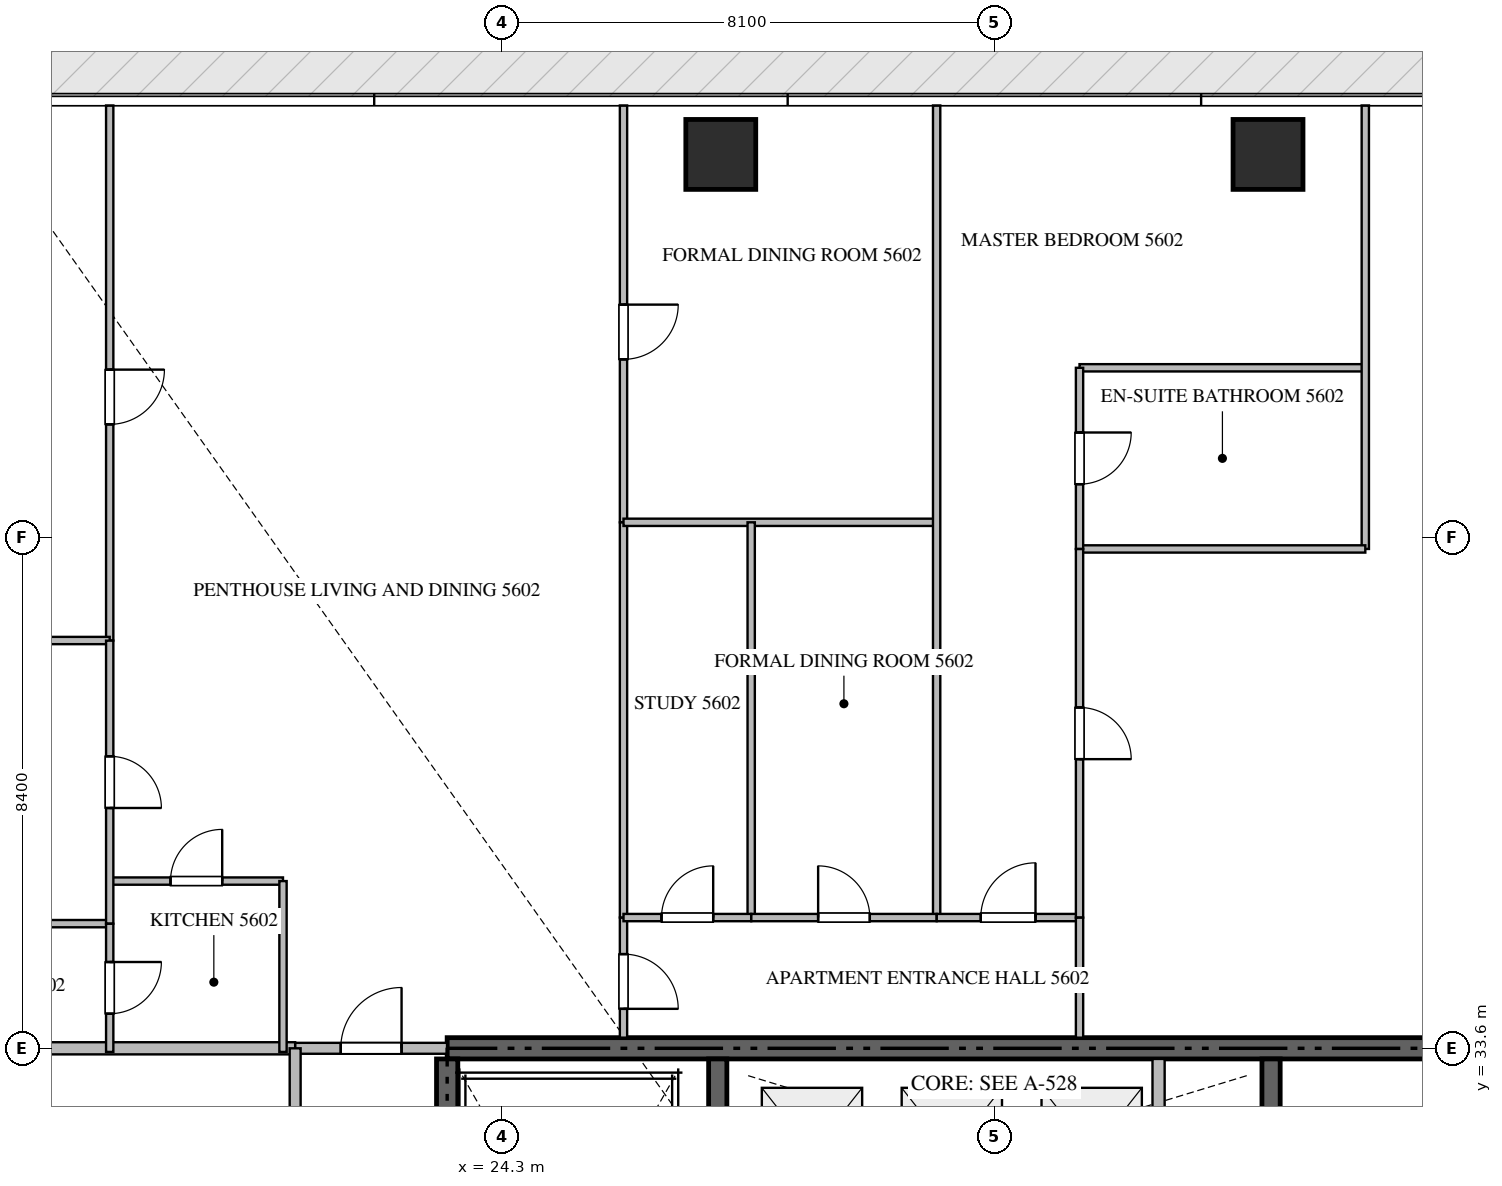
"""IFC4 building model, lengths in metres.
Left out: names, types, materials, properties, quantities, classifications, styles, units other than length and angle.
Written with IfcOpenShell. Run it as: python <this file> out.ifc"""

import sys

from ifc_helpers import new_model, si_unit, direction, frame, frame_2d, origin, origin_2d, place, context, subcontext, project, spatial, rectangle, extrude, source, transform, mapped, element, fill, save


model = new_model("IFC4")
c1 = context("Model", 3, precision=1e-05, world=origin(), true_north=direction((0.0, 1.0)))
c2 = subcontext(c1, "Body", "Model", "MODEL_VIEW")
j1 = project(units=[si_unit("LENGTHUNIT", "METRE"), si_unit("PLANEANGLEUNIT", "RADIAN")], contexts=[c1])
p1 = place(None, origin())
s1 = spatial("IfcSite", under=j1, at=p1, CompositionType="ELEMENT")
p2 = place(p1, origin())
s2 = spatial("IfcBuilding", under=s1, at=p2, CompositionType="ELEMENT")
p3 = place(p2, frame((0.0, 0.0, 225.85)))
s3 = spatial("IfcBuildingStorey", under=s2, at=p3, CompositionType="ELEMENT", Elevation=225.85)
p4 = place(p3, frame((41.4, 33.6, -0.26), z_axis=(0.0, 0.0, 1.0), x_axis=(-1.0, 0.0, 0.0)))
e1 = element("IfcWall", 1, at=p4, inside=s3, PredefinedType="SHEAR", context=c2, shape_type="SweptSolid", body=[
    extrude(rectangle(XDim=18.0, YDim=0.35, at=frame_2d((9.0, 0.0))), origin(), (0.0, 0.0, 1.0), 3.848),
])
p5 = place(p3, frame((23.4, 24.25, -0.26), z_axis=(0.0, 0.0, 1.0), x_axis=(0.0, 1.0, 0.0)))
e2 = element("IfcWall", 2, at=p5, inside=s3, PredefinedType="SHEAR", context=c2, shape_type="SweptSolid", body=[
    extrude(rectangle(XDim=9.175, YDim=0.35, at=frame_2d((4.587, 0.0))), origin(), (0.0, 0.0, 1.0), 3.848),
])
p6 = place(p3, frame((27.85, 23.55, -0.26), z_axis=(0.0, 0.0, 1.0), x_axis=(0.0, 1.0, 0.0)))
e3 = element("IfcWall", 3, at=p6, inside=s3, PredefinedType="SHEAR", context=c2, shape_type="SweptSolid", body=[
    extrude(rectangle(XDim=9.875, YDim=0.3, at=frame_2d((4.938, 0.0))), origin(), (0.0, 0.0, 1.0), 3.848),
])
p7 = place(p3, frame((36.95, 27.05, -0.26), z_axis=(0.0, 0.0, 1.0), x_axis=(0.0, 1.0, 0.0)))
e4 = element("IfcWall", 4, at=p7, inside=s3, PredefinedType="SHEAR", context=c2, shape_type="SweptSolid", body=[
    extrude(rectangle(XDim=6.375, YDim=0.3, at=frame_2d((3.188, 0.0))), origin(), (0.0, 0.0, 1.0), 3.848),
])
m1 = source(origin(), c2, "Body", "SweptSolid", [
    extrude(rectangle(XDim=1.15, YDim=1.15, at=origin_2d()), origin(), (0.0, 0.0, 1.0), 3.85),
])
for number, where, z_axis, x_axis in (
    (5, (27.9, 48.3, -0.26), (0.0, 0.0, 1.0), (1.0, 0.0, 0.0)),
    (6, (36.9, 48.3, -0.26), (0.0, 0.0, 1.0), (1.0, 0.0, 0.0)),
):
    element("IfcColumn", number, at=place(p3, frame(where, z_axis=z_axis, x_axis=x_axis)), inside=s3, PredefinedType="COLUMN", context=c2, shape_type="MappedRepresentation", body=[
        mapped(m1, transform((0.0, 0.0, 0.0), scale=1.0)),
    ])
p8 = place(p3, frame((35.1, 30.75, 0.0), z_axis=(0.0, 0.0, 1.0), x_axis=(0.0, 1.0, 0.0)))
e7 = element("IfcWall", 7, at=p8, inside=s3, PredefinedType="STANDARD", context=c2, shape_type="SweptSolid", body=[
    extrude(rectangle(XDim=2.675, YDim=0.2, at=frame_2d((1.337, 0.0))), origin(), (0.0, 0.0, 1.0), 3.59),
])
p9 = place(p3, frame((7.482, 33.6, 0.0), z_axis=(0.0, 0.0, 1.0), x_axis=(1.0, 0.0, 0.0)))
e8 = element("IfcWall", 8, at=p9, inside=s3, PredefinedType="PARTITIONING", context=c2, shape_type="SweptSolid", body=[
    extrude(rectangle(XDim=13.418, YDim=0.2, at=frame_2d((6.709, 0.0))), origin(), (0.0, 0.0, 1.0), 3.59),
])
p10 = place(p3, frame((20.902, 33.6, 0.0), z_axis=(0.0, 0.0, 1.0), x_axis=(1.0, 0.0, 0.0)))
e9 = element("IfcWall", 9, at=p10, inside=s3, PredefinedType="PARTITIONING", context=c2, shape_type="SweptSolid", body=[
    extrude(rectangle(XDim=2.496, YDim=0.18, at=frame_2d((1.248, 0.0))), origin(), (0.0, 0.0, 1.0), 3.59),
])
p11 = place(p10, frame((0.748, 0.0, 0.0)))
e10 = element("IfcOpeningElement", 10, at=p11, cuts=e9, PredefinedType="OPENING", context=c2, shape_type="SweptSolid", body=[
    extrude(rectangle(XDim=1.0, YDim=2.15, at=frame_2d((0.5, 1.075))), frame((0.0, 0.1, 0.0), z_axis=(0.0, -1.0, 0.0), x_axis=(1.0, 0.0, 0.0)), (0.0, 0.0, 1.0), 0.2),
])
p12 = place(p3, frame((20.9, 16.8, 0.0), z_axis=(0.0, 0.0, 1.0), x_axis=(0.0, 1.0, 0.0)))
e11 = element("IfcWall", 11, at=p12, inside=s3, PredefinedType="PARTITIONING", context=c2, shape_type="SweptSolid", body=[
    extrude(rectangle(XDim=16.8, YDim=0.18, at=frame_2d((8.4, 0.0))), origin(), (0.0, 0.0, 1.0), 3.59),
])
p13 = place(p12, frame((14.5, 0.0, 0.0)))
e12 = element("IfcOpeningElement", 12, at=p13, cuts=e11, PredefinedType="OPENING", context=c2, shape_type="SweptSolid", body=[
    extrude(rectangle(XDim=1.0, YDim=2.15, at=frame_2d((0.5, 1.075))), frame((0.0, 0.1, 0.0), z_axis=(0.0, -1.0, 0.0), x_axis=(1.0, 0.0, 0.0)), (0.0, 0.0, 1.0), 0.2),
])
p14 = place(p3, frame((17.85, 36.35, 0.0), z_axis=(0.0, 0.0, 1.0), x_axis=(1.0, 0.0, 0.0)))
e13 = element("IfcWall", 13, at=p14, inside=s3, PredefinedType="PARTITIONING", context=c2, shape_type="SweptSolid", body=[
    extrude(rectangle(XDim=2.85, YDim=0.12, at=frame_2d((1.425, 0.0))), origin(), (0.0, 0.0, 1.0), 3.59),
])
p15 = place(p14, frame((1.0, 0.0, 0.0)))
e14 = element("IfcOpeningElement", 14, at=p15, cuts=e13, PredefinedType="OPENING", context=c2, shape_type="SweptSolid", body=[
    extrude(rectangle(XDim=0.85, YDim=2.1, at=frame_2d((0.425, 1.05))), frame((0.0, 0.07, 0.0), z_axis=(0.0, -1.0, 0.0), x_axis=(1.0, 0.0, 0.0)), (0.0, 0.0, 1.0), 0.14),
])
p16 = place(p3, frame((20.7, 36.35, 0.0), z_axis=(0.0, 0.0, 1.0), x_axis=(0.0, -1.0, 0.0)))
e15 = element("IfcWall", 15, at=p16, inside=s3, PredefinedType="PARTITIONING", context=c2, shape_type="SweptSolid", body=[
    extrude(rectangle(XDim=2.81, YDim=0.12, at=frame_2d((1.405, 0.0))), origin(), (0.0, 0.0, 1.0), 3.59),
])
p17 = place(p3, frame((17.85, 49.105, 0.0), z_axis=(0.0, 0.0, 1.0), x_axis=(0.0, -1.0, 0.0)))
e16 = element("IfcWall", 16, at=p17, inside=s3, PredefinedType="PARTITIONING", context=c2, shape_type="SweptSolid", body=[
    extrude(rectangle(XDim=8.799, YDim=0.12, at=frame_2d((4.399, 0.0))), origin(), (0.0, 0.0, 1.0), 3.59),
])
p18 = place(p17, frame((4.344, 0.0, 0.0)))
e17 = element("IfcOpeningElement", 17, at=p18, cuts=e16, PredefinedType="OPENING", context=c2, shape_type="SweptSolid", body=[
    extrude(rectangle(XDim=0.9, YDim=2.1, at=frame_2d((0.45, 1.05))), frame((0.0, 0.07, 0.0), z_axis=(0.0, -1.0, 0.0), x_axis=(1.0, 0.0, 0.0)), (0.0, 0.0, 1.0), 0.14),
])
p19 = place(p3, frame((7.495, 40.306, 0.0), z_axis=(0.0, 0.0, 1.0), x_axis=(1.0, 0.0, 0.0)))
e18 = element("IfcWall", 18, at=p19, inside=s3, PredefinedType="PARTITIONING", context=c2, shape_type="SweptSolid", body=[
    extrude(rectangle(XDim=10.355, YDim=0.12, at=frame_2d((5.177, 0.0))), origin(), (0.0, 0.0, 1.0), 3.122),
])
p20 = place(p3, frame((14.65, 35.65, 0.0), z_axis=(0.0, 0.0, 1.0), x_axis=(1.0, 0.0, 0.0)))
e19 = element("IfcWall", 19, at=p20, inside=s3, PredefinedType="PARTITIONING", context=c2, shape_type="SweptSolid", body=[
    extrude(rectangle(XDim=3.2, YDim=0.12, at=frame_2d((1.6, 0.0))), origin(), (0.0, 0.0, 1.0), 3.59),
])
p21 = place(p3, frame((17.85, 40.304, 0.0), z_axis=(0.0, 0.0, 1.0), x_axis=(0.0, -1.0, 0.0)))
e20 = element("IfcWall", 20, at=p21, inside=s3, PredefinedType="PARTITIONING", context=c2, shape_type="SweptSolid", body=[
    extrude(rectangle(XDim=4.654, YDim=0.12, at=frame_2d((2.327, 0.0))), origin(), (0.0, 0.0, 1.0), 3.59),
])
p22 = place(p21, frame((1.902, 0.0, 0.0)))
e21 = element("IfcOpeningElement", 21, at=p22, cuts=e20, PredefinedType="OPENING", context=c2, shape_type="SweptSolid", body=[
    extrude(rectangle(XDim=0.85, YDim=2.1, at=frame_2d((0.425, 1.05))), frame((0.0, 0.07, 0.0), z_axis=(0.0, -1.0, 0.0), x_axis=(1.0, 0.0, 0.0)), (0.0, 0.0, 1.0), 0.14),
])
p23 = place(p3, frame((17.85, 35.648, 0.0), z_axis=(0.0, 0.0, 1.0), x_axis=(0.0, -1.0, 0.0)))
e22 = element("IfcWall", 22, at=p23, inside=s3, PredefinedType="PARTITIONING", context=c2, shape_type="SweptSolid", body=[
    extrude(rectangle(XDim=2.108, YDim=0.12, at=frame_2d((1.054, 0.0))), origin(), (0.0, 0.0, 1.0), 3.59),
])
p24 = place(p23, frame((0.629, 0.0, 0.0)))
e23 = element("IfcOpeningElement", 23, at=p24, cuts=e22, PredefinedType="OPENING", context=c2, shape_type="SweptSolid", body=[
    extrude(rectangle(XDim=0.85, YDim=2.1, at=frame_2d((0.425, 1.05))), frame((0.0, 0.07, 0.0), z_axis=(0.0, -1.0, 0.0), x_axis=(1.0, 0.0, 0.0)), (0.0, 0.0, 1.0), 0.14),
])
p25 = place(p3, frame((26.3, 35.75, 0.0), z_axis=(0.0, 0.0, 1.0), x_axis=(0.0, -1.0, 0.0)))
e24 = element("IfcWall", 24, at=p25, inside=s3, PredefinedType="PARTITIONING", context=c2, shape_type="SweptSolid", body=[
    extrude(rectangle(XDim=1.975, YDim=0.12, at=frame_2d((0.988, 0.0))), origin(), (0.0, 0.0, 1.0), 3.59),
])
p26 = place(p25, frame((0.601, 0.0, 0.0)))
e25 = element("IfcOpeningElement", 25, at=p26, cuts=e24, PredefinedType="OPENING", context=c2, shape_type="SweptSolid", body=[
    extrude(rectangle(XDim=0.9, YDim=2.1, at=frame_2d((0.45, 1.05))), frame((0.0, 0.07, 0.0), z_axis=(0.0, -1.0, 0.0), x_axis=(1.0, 0.0, 0.0)), (0.0, 0.0, 1.0), 0.14),
])
p27 = place(p3, frame((26.3, 49.105, 0.0), z_axis=(0.0, 0.0, 1.0), x_axis=(0.0, -1.0, 0.0)))
e26 = element("IfcWall", 26, at=p27, inside=s3, PredefinedType="PARTITIONING", context=c2, shape_type="SweptSolid", body=[
    extrude(rectangle(XDim=6.855, YDim=0.12, at=frame_2d((3.427, 0.0))), origin(), (0.0, 0.0, 1.0), 3.59),
])
p28 = place(p27, frame((3.275, 0.0, 0.0)))
e27 = element("IfcOpeningElement", 27, at=p28, cuts=e26, PredefinedType="OPENING", context=c2, shape_type="SweptSolid", body=[
    extrude(rectangle(XDim=0.9, YDim=2.1, at=frame_2d((0.45, 1.05))), frame((0.0, 0.07, 0.0), z_axis=(0.0, -1.0, 0.0), x_axis=(1.0, 0.0, 0.0)), (0.0, 0.0, 1.0), 0.14),
])
p29 = place(p3, frame((26.3, 42.248, 0.0), z_axis=(0.0, 0.0, 1.0), x_axis=(0.0, -1.0, 0.0)))
e28 = element("IfcWall", 28, at=p29, inside=s3, PredefinedType="PARTITIONING", context=c2, shape_type="SweptSolid", body=[
    extrude(rectangle(XDim=6.496, YDim=0.12, at=frame_2d((3.248, 0.0))), origin(), (0.0, 0.0, 1.0), 3.59),
])
p30 = place(p3, frame((26.3, 42.25, 0.0), z_axis=(0.0, 0.0, 1.0), x_axis=(1.0, 0.0, 0.0)))
e29 = element("IfcWall", 29, at=p30, inside=s3, PredefinedType="PARTITIONING", context=c2, shape_type="SweptSolid", body=[
    extrude(rectangle(XDim=5.15, YDim=0.12, at=frame_2d((2.575, 0.0))), origin(), (0.0, 0.0, 1.0), 3.59),
])
p31 = place(p3, frame((31.45, 49.105, 0.0), z_axis=(0.0, 0.0, 1.0), x_axis=(0.0, -1.0, 0.0)))
e30 = element("IfcWall", 30, at=p31, inside=s3, PredefinedType="PARTITIONING", context=c2, shape_type="SweptSolid", body=[
    extrude(rectangle(XDim=13.355, YDim=0.12, at=frame_2d((6.677, 0.0))), origin(), (0.0, 0.0, 1.0), 3.59),
])
p32 = place(p3, frame((28.4, 42.25, 0.0), z_axis=(0.0, 0.0, 1.0), x_axis=(0.0, -1.0, 0.0)))
e31 = element("IfcWall", 31, at=p32, inside=s3, PredefinedType="PARTITIONING", context=c2, shape_type="SweptSolid", body=[
    extrude(rectangle(XDim=6.5, YDim=0.12, at=frame_2d((3.25, 0.0))), origin(), (0.0, 0.0, 1.0), 3.59),
])
p33 = place(p3, frame((26.3, 35.75, 0.0), z_axis=(0.0, 0.0, 1.0), x_axis=(1.0, 0.0, 0.0)))
e32 = element("IfcWall", 32, at=p33, inside=s3, PredefinedType="PARTITIONING", context=c2, shape_type="SweptSolid", body=[
    extrude(rectangle(XDim=2.1, YDim=0.12, at=frame_2d((1.05, 0.0))), origin(), (0.0, 0.0, 1.0), 3.59),
])
p34 = place(p33, frame((0.625, 0.0, 0.0)))
e33 = element("IfcOpeningElement", 33, at=p34, cuts=e32, PredefinedType="OPENING", context=c2, shape_type="SweptSolid", body=[
    extrude(rectangle(XDim=0.85, YDim=2.1, at=frame_2d((0.425, 1.05))), frame((0.0, 0.07, 0.0), z_axis=(0.0, -1.0, 0.0), x_axis=(1.0, 0.0, 0.0)), (0.0, 0.0, 1.0), 0.14),
])
p35 = place(p3, frame((28.402, 35.75, 0.0), z_axis=(0.0, 0.0, 1.0), x_axis=(1.0, 0.0, 0.0)))
e34 = element("IfcWall", 34, at=p35, inside=s3, PredefinedType="PARTITIONING", context=c2, shape_type="SweptSolid", body=[
    extrude(rectangle(XDim=3.048, YDim=0.12, at=frame_2d((1.524, 0.0))), origin(), (0.0, 0.0, 1.0), 3.59),
])
p36 = place(p35, frame((1.099, 0.0, 0.0)))
e35 = element("IfcOpeningElement", 35, at=p36, cuts=e34, PredefinedType="OPENING", context=c2, shape_type="SweptSolid", body=[
    extrude(rectangle(XDim=0.85, YDim=2.1, at=frame_2d((0.425, 1.05))), frame((0.0, 0.07, 0.0), z_axis=(0.0, -1.0, 0.0), x_axis=(1.0, 0.0, 0.0)), (0.0, 0.0, 1.0), 0.14),
])
p37 = place(p3, frame((31.452, 35.75, 0.0), z_axis=(0.0, 0.0, 1.0), x_axis=(1.0, 0.0, 0.0)))
e36 = element("IfcWall", 36, at=p37, inside=s3, PredefinedType="PARTITIONING", context=c2, shape_type="SweptSolid", body=[
    extrude(rectangle(XDim=2.348, YDim=0.12, at=frame_2d((1.174, 0.0))), origin(), (0.0, 0.0, 1.0), 3.59),
])
p38 = place(p37, frame((0.724, 0.0, 0.0)))
e37 = element("IfcOpeningElement", 37, at=p38, cuts=e36, PredefinedType="OPENING", context=c2, shape_type="SweptSolid", body=[
    extrude(rectangle(XDim=0.9, YDim=2.1, at=frame_2d((0.45, 1.05))), frame((0.0, 0.07, 0.0), z_axis=(0.0, -1.0, 0.0), x_axis=(1.0, 0.0, 0.0)), (0.0, 0.0, 1.0), 0.14),
])
p39 = place(p3, frame((33.8, 44.791, 0.0), z_axis=(0.0, 0.0, 1.0), x_axis=(1.0, 0.0, 0.0)))
e38 = element("IfcWall", 38, at=p39, inside=s3, PredefinedType="PARTITIONING", context=c2, shape_type="SweptSolid", body=[
    extrude(rectangle(XDim=4.7, YDim=0.12, at=frame_2d((2.35, 0.0))), origin(), (0.0, 0.0, 1.0), 3.59),
])
p40 = place(p3, frame((38.5, 49.105, 0.0), z_axis=(0.0, 0.0, 1.0), x_axis=(0.0, -1.0, 0.0)))
e39 = element("IfcWall", 39, at=p40, inside=s3, PredefinedType="PARTITIONING", context=c2, shape_type="SweptSolid", body=[
    extrude(rectangle(XDim=7.293, YDim=0.12, at=frame_2d((3.646, 0.0))), origin(), (0.0, 0.0, 1.0), 3.59),
])
p41 = place(p3, frame((33.8, 41.812, 0.0), z_axis=(0.0, 0.0, 1.0), x_axis=(1.0, 0.0, 0.0)))
e40 = element("IfcWall", 40, at=p41, inside=s3, PredefinedType="PARTITIONING", context=c2, shape_type="SweptSolid", body=[
    extrude(rectangle(XDim=4.7, YDim=0.12, at=frame_2d((2.35, 0.0))), origin(), (0.0, 0.0, 1.0), 3.59),
])
p42 = place(p3, frame((33.8, 44.791, 0.0), z_axis=(0.0, 0.0, 1.0), x_axis=(0.0, -1.0, 0.0)))
e41 = element("IfcWall", 41, at=p42, inside=s3, PredefinedType="PARTITIONING", context=c2, shape_type="SweptSolid", body=[
    extrude(rectangle(XDim=2.979, YDim=0.12, at=frame_2d((1.49, 0.0))), origin(), (0.0, 0.0, 1.0), 3.59),
])
p43 = place(p42, frame((1.064, 0.0, 0.0)))
e42 = element("IfcOpeningElement", 42, at=p43, cuts=e41, PredefinedType="OPENING", context=c2, shape_type="SweptSolid", body=[
    extrude(rectangle(XDim=0.85, YDim=2.1, at=frame_2d((0.425, 1.05))), frame((0.0, 0.07, 0.0), z_axis=(0.0, -1.0, 0.0), x_axis=(1.0, 0.0, 0.0)), (0.0, 0.0, 1.0), 0.14),
])
p44 = place(p3, frame((33.8, 41.81, 0.0), z_axis=(0.0, 0.0, 1.0), x_axis=(0.0, -1.0, 0.0)))
e43 = element("IfcWall", 43, at=p44, inside=s3, PredefinedType="PARTITIONING", context=c2, shape_type="SweptSolid", body=[
    extrude(rectangle(XDim=6.06, YDim=0.12, at=frame_2d((3.03, 0.0))), origin(), (0.0, 0.0, 1.0), 3.59),
])
p45 = place(p44, frame((2.605, 0.0, 0.0)))
e44 = element("IfcOpeningElement", 44, at=p45, cuts=e43, PredefinedType="OPENING", context=c2, shape_type="SweptSolid", body=[
    extrude(rectangle(XDim=0.85, YDim=2.1, at=frame_2d((0.425, 1.05))), frame((0.0, 0.07, 0.0), z_axis=(0.0, -1.0, 0.0), x_axis=(1.0, 0.0, 0.0)), (0.0, 0.0, 1.0), 0.14),
])
p46 = place(p3, frame((33.8, 35.748, 0.0), z_axis=(0.0, 0.0, 1.0), x_axis=(0.0, -1.0, 0.0)))
e45 = element("IfcWall", 45, at=p46, inside=s3, PredefinedType="PARTITIONING", context=c2, shape_type="SweptSolid", body=[
    extrude(rectangle(XDim=1.973, YDim=0.12, at=frame_2d((0.987, 0.0))), origin(), (0.0, 0.0, 1.0), 3.59),
])
m2 = source(origin(), c2, "Body", "SweptSolid", [
    extrude(rectangle(XDim=1.0, YDim=2.15, at=frame_2d((0.5, 1.075))), frame((0.0, 0.025, 0.0), z_axis=(0.0, -1.0, 0.0), x_axis=(1.0, 0.0, 0.0)), (0.0, 0.0, 1.0), 0.05),
])
p47 = place(p11, origin())
e46 = element("IfcDoor", 46, at=p47, inside=s3, OperationType="SINGLE_SWING_RIGHT", PredefinedType="DOOR", context=c2, shape_type="MappedRepresentation", body=[
    mapped(m2, transform((0.0, 0.0, 0.0), scale=1.0)),
])
fill(e10, e46)
m3 = source(origin(), c2, "Body", "SweptSolid", [
    extrude(rectangle(XDim=0.85, YDim=2.1, at=frame_2d((0.425, 1.05))), frame((0.0, 0.025, 0.0), z_axis=(0.0, -1.0, 0.0), x_axis=(1.0, 0.0, 0.0)), (0.0, 0.0, 1.0), 0.05),
])
p48 = place(p15, origin())
e47 = element("IfcDoor", 47, at=p48, inside=s3, OperationType="SINGLE_SWING_RIGHT", PredefinedType="DOOR", context=c2, shape_type="MappedRepresentation", body=[
    mapped(m3, transform((0.0, 0.0, 0.0), scale=1.0)),
])
fill(e14, e47)
m4 = source(origin(), c2, "Body", "SweptSolid", [
    extrude(rectangle(XDim=0.9, YDim=2.1, at=frame_2d((0.45, 1.05))), frame((0.0, 0.025, 0.0), z_axis=(0.0, -1.0, 0.0), x_axis=(1.0, 0.0, 0.0)), (0.0, 0.0, 1.0), 0.05),
])
p49 = place(p18, origin())
e48 = element("IfcDoor", 48, at=p49, inside=s3, OperationType="SINGLE_SWING_LEFT", PredefinedType="DOOR", context=c2, shape_type="MappedRepresentation", body=[
    mapped(m4, transform((0.0, 0.0, 0.0), scale=1.0)),
])
fill(e17, e48)
p50 = place(p22, origin())
e49 = element("IfcDoor", 49, at=p50, inside=s3, OperationType="SINGLE_SWING_RIGHT", PredefinedType="DOOR", context=c2, shape_type="MappedRepresentation", body=[
    mapped(m3, transform((0.0, 0.0, 0.0), scale=1.0)),
])
fill(e21, e49)
p51 = place(p24, origin())
e50 = element("IfcDoor", 50, at=p51, inside=s3, OperationType="SINGLE_SWING_LEFT", PredefinedType="DOOR", context=c2, shape_type="MappedRepresentation", body=[
    mapped(m3, transform((0.0, 0.0, 0.0), scale=1.0)),
])
fill(e23, e50)
p52 = place(p26, origin())
e51 = element("IfcDoor", 51, at=p52, inside=s3, OperationType="SINGLE_SWING_RIGHT", PredefinedType="DOOR", context=c2, shape_type="MappedRepresentation", body=[
    mapped(m4, transform((0.0, 0.0, 0.0), scale=1.0)),
])
fill(e25, e51)
p53 = place(p28, origin())
e52 = element("IfcDoor", 52, at=p53, inside=s3, OperationType="SINGLE_SWING_LEFT", PredefinedType="DOOR", context=c2, shape_type="MappedRepresentation", body=[
    mapped(m4, transform((0.0, 0.0, 0.0), scale=1.0)),
])
fill(e27, e52)
p54 = place(p34, origin())
e53 = element("IfcDoor", 53, at=p54, inside=s3, OperationType="SINGLE_SWING_RIGHT", PredefinedType="DOOR", context=c2, shape_type="MappedRepresentation", body=[
    mapped(m3, transform((0.0, 0.0, 0.0), scale=1.0)),
])
fill(e33, e53)
p55 = place(p36, origin())
e54 = element("IfcDoor", 54, at=p55, inside=s3, OperationType="SINGLE_SWING_LEFT", PredefinedType="DOOR", context=c2, shape_type="MappedRepresentation", body=[
    mapped(m3, transform((0.0, 0.0, 0.0), scale=1.0)),
])
fill(e35, e54)
p56 = place(p38, origin())
e55 = element("IfcDoor", 55, at=p56, inside=s3, OperationType="SINGLE_SWING_RIGHT", PredefinedType="DOOR", context=c2, shape_type="MappedRepresentation", body=[
    mapped(m4, transform((0.0, 0.0, 0.0), scale=1.0)),
])
fill(e37, e55)
p57 = place(p43, origin())
e56 = element("IfcDoor", 56, at=p57, inside=s3, OperationType="SINGLE_SWING_LEFT", PredefinedType="DOOR", context=c2, shape_type="MappedRepresentation", body=[
    mapped(m3, transform((0.0, 0.0, 0.0), scale=1.0)),
])
fill(e42, e56)
p58 = place(p45, origin())
e57 = element("IfcDoor", 57, at=p58, inside=s3, OperationType="SINGLE_SWING_RIGHT", PredefinedType="DOOR", context=c2, shape_type="MappedRepresentation", body=[
    mapped(m3, transform((0.0, 0.0, 0.0), scale=1.0)),
])
fill(e44, e57)
save(model, sys.argv[1])
